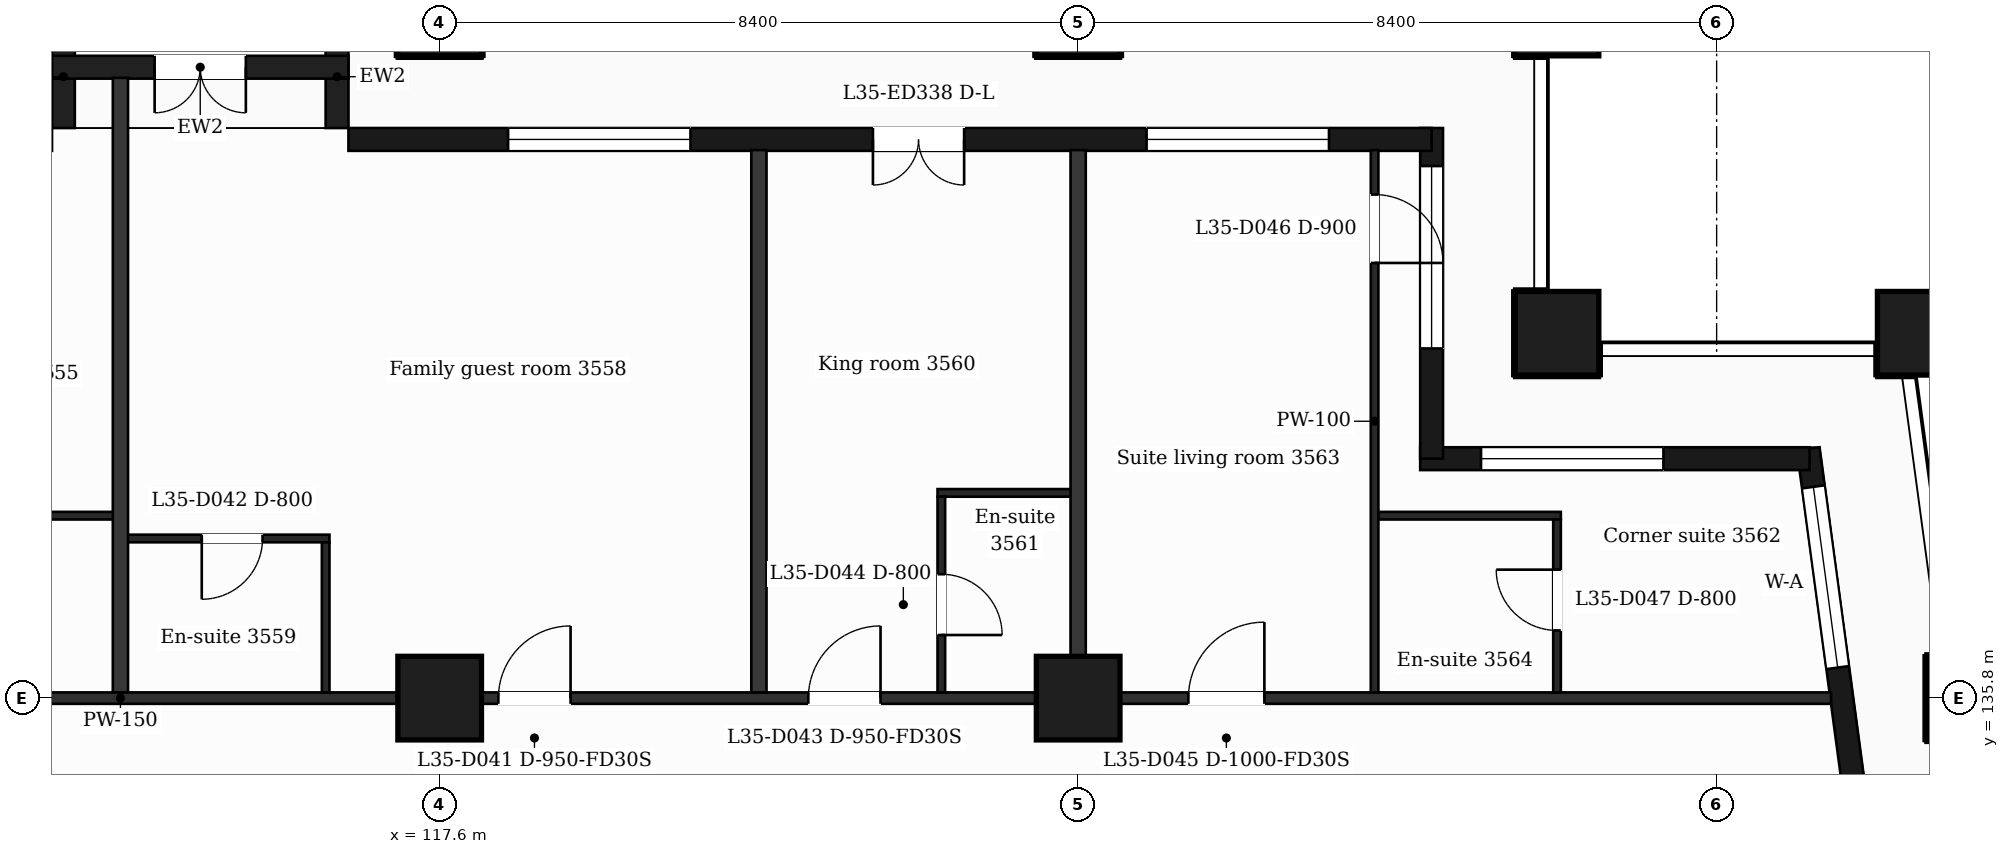
"""IFC4 building model, lengths in metres.
Left out: names, types, materials, properties, quantities, classifications, styles, units other than length and angle.
Written with IfcOpenShell. Run it as: python <this file> out.ifc"""

import sys

from ifc_helpers import new_model, si_unit, direction, frame, frame_2d, origin, origin_2d, place, context, subcontext, project, spatial, rectangle, extrude, element, fill, save


model = new_model("IFC4")
c1 = context("Model", 3, precision=1e-05, world=origin(), true_north=direction((0.0, 1.0)))
c2 = subcontext(c1, "Body", "Model", "MODEL_VIEW")
j1 = project(units=[si_unit("LENGTHUNIT", "METRE"), si_unit("PLANEANGLEUNIT", "RADIAN")], contexts=[c1])
p1 = place(None, origin())
s1 = spatial("IfcSite", under=j1, at=p1, CompositionType="ELEMENT")
p2 = place(p1, origin())
s2 = spatial("IfcBuilding", under=s1, at=p2, CompositionType="ELEMENT")
p3 = place(p2, frame((0.0, 0.0, 151.5)))
s3 = spatial("IfcBuildingStorey", under=s2, at=p3, CompositionType="ELEMENT", Elevation=151.5)
for number, where, z_axis, x_axis in (
    (1, (132.3, 140.6, 0.0), (0.0, 0.0, 1.0), (1.0, 0.0, 0.0)),
    (2, (137.065, 140.6, 0.0), (0.0, 0.0, 1.0), (1.0, 0.0, 0.0)),
    (3, (117.6, 135.8, 0.0), (0.0, 0.0, 1.0), (1.0, 0.0, 0.0)),
    (4, (126.0, 135.8, 0.0), (0.0, 0.0, 1.0), (1.0, 0.0, 0.0)),
    (5, (137.711, 135.8, 0.0), (0.0, 0.0, 1.0), (1.0, 0.0, 0.0)),
    (6, (117.6, 144.8, 0.0), (0.0, 0.0, 1.0), (1.0, 0.0, 0.0)),
    (7, (126.0, 144.8, 0.0), (0.0, 0.0, 1.0), (1.0, 0.0, 0.0)),
    (8, (132.3, 144.8, 0.0), (0.0, 0.0, 1.0), (1.0, 0.0, 0.0)),
):
    element("IfcColumn", number, at=place(p3, frame(where, z_axis=z_axis, x_axis=x_axis)), inside=s3, PredefinedType="COLUMN", context=c2, shape_type="SweptSolid", body=[
        extrude(rectangle(XDim=1.1, YDim=1.1, at=origin_2d()), origin(), (0.0, 0.0, 1.0), 3.7),
    ])
p4 = place(p3, frame((136.504, 132.4, 0.0), z_axis=(0.0, 0.0, 1.0), x_axis=(-0.133399697462, 0.99106231929, 0.0)))
e9 = element("IfcWall", 9, at=p4, inside=s3, PredefinedType="SOLIDWALL", context=c2, shape_type="SweptSolid", body=[
    extrude(rectangle(XDim=6.74, YDim=0.3, at=frame_2d((3.37, 0.0))), origin(), (0.0, 0.0, 1.0), 3.38),
])
p5 = place(p4, frame((1.115, 0.0, 0.0)))
e10 = element("IfcOpeningElement", 10, at=p5, cuts=e9, PredefinedType="OPENING", context=c2, shape_type="SweptSolid", body=[
    extrude(rectangle(XDim=1.2, YDim=2.4, at=frame_2d((0.6, 1.2))), frame((0.0, 0.16, 0.0), z_axis=(0.0, -1.0, 0.0), x_axis=(1.0, 0.0, 0.0)), (0.0, 0.0, 1.0), 0.32),
])
p6 = place(p4, frame((3.835, 0.0, 0.9)))
e11 = element("IfcOpeningElement", 11, at=p6, cuts=e9, PredefinedType="OPENING", context=c2, shape_type="SweptSolid", body=[
    extrude(rectangle(XDim=2.4, YDim=2.1, at=frame_2d((1.2, 1.05))), frame((0.0, 0.16, 0.0), z_axis=(0.0, -1.0, 0.0), x_axis=(1.0, 0.0, 0.0)), (0.0, 0.0, 1.0), 0.32),
])
p7 = place(p3, frame((135.623, 138.95, 0.0), z_axis=(0.0, 0.0, 1.0), x_axis=(-1.0, 0.0, 0.0)))
e12 = element("IfcWall", 12, at=p7, inside=s3, PredefinedType="SOLIDWALL", context=c2, shape_type="SweptSolid", body=[
    extrude(rectangle(XDim=5.123, YDim=0.3, at=frame_2d((2.561, 0.0))), origin(), (0.0, 0.0, 1.0), 3.38),
])
p8 = place(p7, frame((1.923, 0.0, 0.9)))
e13 = element("IfcOpeningElement", 13, at=p8, cuts=e12, PredefinedType="OPENING", context=c2, shape_type="SweptSolid", body=[
    extrude(rectangle(XDim=2.4, YDim=2.1, at=frame_2d((1.2, 1.05))), frame((0.0, 0.16, 0.0), z_axis=(0.0, -1.0, 0.0), x_axis=(1.0, 0.0, 0.0)), (0.0, 0.0, 1.0), 0.32),
])
p9 = place(p3, frame((130.65, 138.95, 0.0), z_axis=(0.0, 0.0, 1.0), x_axis=(0.0, 1.0, 0.0)))
e14 = element("IfcWall", 14, at=p9, inside=s3, PredefinedType="SOLIDWALL", context=c2, shape_type="SweptSolid", body=[
    extrude(rectangle(XDim=4.35, YDim=0.3, at=frame_2d((2.175, 0.0))), origin(), (0.0, 0.0, 1.0), 3.38),
])
p10 = place(p9, frame((1.45, 0.0, 0.9)))
e15 = element("IfcOpeningElement", 15, at=p10, cuts=e14, PredefinedType="OPENING", context=c2, shape_type="SweptSolid", body=[
    extrude(rectangle(XDim=2.4, YDim=2.1, at=frame_2d((1.2, 1.05))), frame((0.0, 0.16, 0.0), z_axis=(0.0, -1.0, 0.0), x_axis=(1.0, 0.0, 0.0)), (0.0, 0.0, 1.0), 0.32),
])
p11 = place(p3, frame((130.65, 143.15, 0.0), z_axis=(0.0, 0.0, 1.0), x_axis=(-1.0, 0.0, 0.0)))
e16 = element("IfcWall", 16, at=p11, inside=s3, PredefinedType="SOLIDWALL", context=c2, shape_type="SweptSolid", body=[
    extrude(rectangle(XDim=14.25, YDim=0.3, at=frame_2d((7.125, 0.0))), origin(), (0.0, 0.0, 1.0), 3.38),
])
p12 = place(p11, frame((1.35, 0.0, 0.9)))
e17 = element("IfcOpeningElement", 17, at=p12, cuts=e16, PredefinedType="OPENING", context=c2, shape_type="SweptSolid", body=[
    extrude(rectangle(XDim=2.4, YDim=2.1, at=frame_2d((1.2, 1.05))), frame((0.0, 0.16, 0.0), z_axis=(0.0, -1.0, 0.0), x_axis=(1.0, 0.0, 0.0)), (0.0, 0.0, 1.0), 0.32),
])
p13 = place(p11, frame((6.15, 0.0, 0.0)))
e18 = element("IfcOpeningElement", 18, at=p13, cuts=e16, PredefinedType="OPENING", context=c2, shape_type="SweptSolid", body=[
    extrude(rectangle(XDim=1.2, YDim=2.4, at=frame_2d((0.6, 1.2))), frame((0.0, 0.16, 0.0), z_axis=(0.0, -1.0, 0.0), x_axis=(1.0, 0.0, 0.0)), (0.0, 0.0, 1.0), 0.32),
])
p14 = place(p11, frame((9.75, 0.0, 0.9)))
e19 = element("IfcOpeningElement", 19, at=p14, cuts=e16, PredefinedType="OPENING", context=c2, shape_type="SweptSolid", body=[
    extrude(rectangle(XDim=2.4, YDim=2.1, at=frame_2d((1.2, 1.05))), frame((0.0, 0.16, 0.0), z_axis=(0.0, -1.0, 0.0), x_axis=(1.0, 0.0, 0.0)), (0.0, 0.0, 1.0), 0.32),
])
for number, where, z_axis, x_axis in (
    (20, (116.25, 143.3, 0.0), (0.0, 0.0, 1.0), (0.0, 1.0, 0.0)),
    (21, (112.65, 143.3, 0.0), (0.0, 0.0, 1.0), (0.0, 1.0, 0.0)),
):
    element("IfcWall", number, at=place(p3, frame(where, z_axis=z_axis, x_axis=x_axis)), inside=s3, PredefinedType="SOLIDWALL", context=c2, shape_type="SweptSolid", body=[
        extrude(rectangle(XDim=1.35, YDim=0.3, at=frame_2d((0.675, 0.0))), origin(), (0.0, 0.0, 1.0), 3.38),
    ])
p15 = place(p3, frame((116.4, 144.1, 0.0), z_axis=(0.0, 0.0, 1.0), x_axis=(-1.0, 0.0, 0.0)))
e22 = element("IfcWall", 22, at=p15, inside=s3, PredefinedType="SOLIDWALL", context=c2, shape_type="SweptSolid", body=[
    extrude(rectangle(XDim=3.9, YDim=0.3, at=frame_2d((1.95, 0.0))), origin(), (0.0, 0.0, 1.0), 3.38),
])
p16 = place(p15, frame((1.35, 0.0, 0.0)))
e23 = element("IfcOpeningElement", 23, at=p16, cuts=e22, PredefinedType="OPENING", context=c2, shape_type="SweptSolid", body=[
    extrude(rectangle(XDim=1.2, YDim=2.4, at=frame_2d((0.6, 1.2))), frame((0.0, 0.16, 0.0), z_axis=(0.0, -1.0, 0.0), x_axis=(1.0, 0.0, 0.0)), (0.0, 0.0, 1.0), 0.32),
])
p17 = place(p3, frame((90.895, 135.8, 0.0), z_axis=(0.0, 0.0, 1.0), x_axis=(1.0, 0.0, 0.0)))
e24 = element("IfcWall", 24, at=p17, inside=s3, PredefinedType="PARTITIONING", context=c2, shape_type="SweptSolid", body=[
    extrude(rectangle(XDim=45.011, YDim=0.15, at=frame_2d((22.505, 0.0))), origin(), (0.0, 0.0, 1.0), 3.38),
])
p18 = place(p17, frame((6.906, 0.0, 0.0)))
e25 = element("IfcOpeningElement", 25, at=p18, cuts=e24, PredefinedType="OPENING", context=c2, shape_type="SweptSolid", body=[
    extrude(rectangle(XDim=1.0, YDim=2.1, at=frame_2d((0.5, 1.05))), frame((0.0, 0.085, 0.0), z_axis=(0.0, -1.0, 0.0), x_axis=(1.0, 0.0, 0.0)), (0.0, 0.0, 1.0), 0.17),
])
p19 = place(p17, frame((12.935, 0.0, 0.0)))
e26 = element("IfcOpeningElement", 26, at=p19, cuts=e24, PredefinedType="OPENING", context=c2, shape_type="SweptSolid", body=[
    extrude(rectangle(XDim=1.0, YDim=2.1, at=frame_2d((0.5, 1.05))), frame((0.0, 0.085, 0.0), z_axis=(0.0, -1.0, 0.0), x_axis=(1.0, 0.0, 0.0)), (0.0, 0.0, 1.0), 0.17),
])
p20 = place(p17, frame((27.477, 0.0, 0.0)))
e27 = element("IfcOpeningElement", 27, at=p20, cuts=e24, PredefinedType="OPENING", context=c2, shape_type="SweptSolid", body=[
    extrude(rectangle(XDim=0.95, YDim=2.1, at=frame_2d((0.475, 1.05))), frame((0.0, 0.085, 0.0), z_axis=(0.0, -1.0, 0.0), x_axis=(1.0, 0.0, 0.0)), (0.0, 0.0, 1.0), 0.17),
])
p21 = place(p17, frame((31.555, 0.0, 0.0)))
e28 = element("IfcOpeningElement", 28, at=p21, cuts=e24, PredefinedType="OPENING", context=c2, shape_type="SweptSolid", body=[
    extrude(rectangle(XDim=0.95, YDim=2.1, at=frame_2d((0.475, 1.05))), frame((0.0, 0.085, 0.0), z_axis=(0.0, -1.0, 0.0), x_axis=(1.0, 0.0, 0.0)), (0.0, 0.0, 1.0), 0.17),
])
p22 = place(p17, frame((36.555, 0.0, 0.0)))
e29 = element("IfcOpeningElement", 29, at=p22, cuts=e24, PredefinedType="OPENING", context=c2, shape_type="SweptSolid", body=[
    extrude(rectangle(XDim=1.0, YDim=2.1, at=frame_2d((0.5, 1.05))), frame((0.0, 0.085, 0.0), z_axis=(0.0, -1.0, 0.0), x_axis=(1.0, 0.0, 0.0)), (0.0, 0.0, 1.0), 0.17),
])
p23 = place(p3, frame((113.4, 137.9, 0.0), z_axis=(0.0, 0.0, 1.0), x_axis=(1.0, 0.0, 0.0)))
e30 = element("IfcWall", 30, at=p23, inside=s3, PredefinedType="PARTITIONING", context=c2, shape_type="SweptSolid", body=[
    extrude(rectangle(XDim=2.75, YDim=0.1, at=frame_2d((1.375, 0.0))), origin(), (0.0, 0.0, 1.0), 3.38),
])
p24 = place(p23, frame((1.07, 0.0, 0.0)))
e31 = element("IfcOpeningElement", 31, at=p24, cuts=e30, PredefinedType="OPENING", context=c2, shape_type="SweptSolid", body=[
    extrude(rectangle(XDim=0.8, YDim=2.1, at=frame_2d((0.4, 1.05))), frame((0.0, 0.06, 0.0), z_axis=(0.0, -1.0, 0.0), x_axis=(1.0, 0.0, 0.0)), (0.0, 0.0, 1.0), 0.12),
])
p25 = place(p3, frame((111.25, 138.2, 0.0), z_axis=(0.0, 0.0, 1.0), x_axis=(1.0, 0.0, 0.0)))
e32 = element("IfcWall", 32, at=p25, inside=s3, PredefinedType="PARTITIONING", context=c2, shape_type="SweptSolid", body=[
    extrude(rectangle(XDim=2.15, YDim=0.1, at=frame_2d((1.075, 0.0))), origin(), (0.0, 0.0, 1.0), 3.38),
])
p26 = place(p3, frame((129.9, 138.2, 0.0), z_axis=(0.0, 0.0, 1.0), x_axis=(1.0, 0.0, 0.0)))
e33 = element("IfcWall", 33, at=p26, inside=s3, PredefinedType="PARTITIONING", context=c2, shape_type="SweptSolid", body=[
    extrude(rectangle(XDim=2.45, YDim=0.1, at=frame_2d((1.225, 0.0))), origin(), (0.0, 0.0, 1.0), 3.38),
])
p27 = place(p3, frame((124.15, 138.5, 0.0), z_axis=(0.0, 0.0, 1.0), x_axis=(1.0, 0.0, 0.0)))
e34 = element("IfcWall", 34, at=p27, inside=s3, PredefinedType="PARTITIONING", context=c2, shape_type="SweptSolid", body=[
    extrude(rectangle(XDim=1.85, YDim=0.1, at=frame_2d((0.925, 0.0))), origin(), (0.0, 0.0, 1.0), 3.38),
])
p28 = place(p3, frame((113.4, 135.875, 0.0), z_axis=(0.0, 0.0, 1.0), x_axis=(0.0, 1.0, 0.0)))
e35 = element("IfcWall", 35, at=p28, inside=s3, PredefinedType="PARTITIONING", context=c2, shape_type="SweptSolid", body=[
    extrude(rectangle(XDim=8.085, YDim=0.2, at=frame_2d((4.042, 0.0))), origin(), (0.0, 0.0, 1.0), 3.38),
])
p29 = place(p3, frame((116.1, 135.875, 0.0), z_axis=(0.0, 0.0, 1.0), x_axis=(0.0, 1.0, 0.0)))
e36 = element("IfcWall", 36, at=p29, inside=s3, PredefinedType="PARTITIONING", context=c2, shape_type="SweptSolid", body=[
    extrude(rectangle(XDim=1.975, YDim=0.1, at=frame_2d((0.988, 0.0))), origin(), (0.0, 0.0, 1.0), 3.38),
])
p30 = place(p3, frame((121.8, 135.875, 0.0), z_axis=(0.0, 0.0, 1.0), x_axis=(0.0, 1.0, 0.0)))
e37 = element("IfcWall", 37, at=p30, inside=s3, PredefinedType="PARTITIONING", context=c2, shape_type="SweptSolid", body=[
    extrude(rectangle(XDim=7.135, YDim=0.2, at=frame_2d((3.567, 0.0))), origin(), (0.0, 0.0, 1.0), 3.38),
])
p31 = place(p3, frame((124.2, 135.875, 0.0), z_axis=(0.0, 0.0, 1.0), x_axis=(0.0, 1.0, 0.0)))
e38 = element("IfcWall", 38, at=p31, inside=s3, PredefinedType="PARTITIONING", context=c2, shape_type="SweptSolid", body=[
    extrude(rectangle(XDim=2.575, YDim=0.1, at=frame_2d((1.288, 0.0))), origin(), (0.0, 0.0, 1.0), 3.38),
])
p32 = place(p31, frame((0.755, 0.0, 0.0)))
e39 = element("IfcOpeningElement", 39, at=p32, cuts=e38, PredefinedType="OPENING", context=c2, shape_type="SweptSolid", body=[
    extrude(rectangle(XDim=0.8, YDim=2.1, at=frame_2d((0.4, 1.05))), frame((0.0, 0.06, 0.0), z_axis=(0.0, -1.0, 0.0), x_axis=(1.0, 0.0, 0.0)), (0.0, 0.0, 1.0), 0.12),
])
p33 = place(p3, frame((126.0, 135.875, 0.0), z_axis=(0.0, 0.0, 1.0), x_axis=(0.0, 1.0, 0.0)))
e40 = element("IfcWall", 40, at=p33, inside=s3, PredefinedType="PARTITIONING", context=c2, shape_type="SweptSolid", body=[
    extrude(rectangle(XDim=7.135, YDim=0.2, at=frame_2d((3.567, 0.0))), origin(), (0.0, 0.0, 1.0), 3.38),
])
p34 = place(p3, frame((129.9, 135.875, 0.0), z_axis=(0.0, 0.0, 1.0), x_axis=(0.0, 1.0, 0.0)))
e41 = element("IfcWall", 41, at=p34, inside=s3, PredefinedType="PARTITIONING", context=c2, shape_type="SweptSolid", body=[
    extrude(rectangle(XDim=7.135, YDim=0.1, at=frame_2d((3.567, 0.0))), origin(), (0.0, 0.0, 1.0), 3.38),
])
p35 = place(p34, frame((5.65, 0.0, 0.0)))
e42 = element("IfcOpeningElement", 42, at=p35, cuts=e41, PredefinedType="OPENING", context=c2, shape_type="SweptSolid", body=[
    extrude(rectangle(XDim=0.9, YDim=2.1, at=frame_2d((0.45, 1.05))), frame((0.0, 0.06, 0.0), z_axis=(0.0, -1.0, 0.0), x_axis=(1.0, 0.0, 0.0)), (0.0, 0.0, 1.0), 0.12),
])
p36 = place(p3, frame((132.3, 135.875, 0.0), z_axis=(0.0, 0.0, 1.0), x_axis=(0.0, 1.0, 0.0)))
e43 = element("IfcWall", 43, at=p36, inside=s3, PredefinedType="PARTITIONING", context=c2, shape_type="SweptSolid", body=[
    extrude(rectangle(XDim=2.275, YDim=0.1, at=frame_2d((1.137, 0.0))), origin(), (0.0, 0.0, 1.0), 3.38),
])
p37 = place(p36, frame((0.815, 0.0, 0.0)))
e44 = element("IfcOpeningElement", 44, at=p37, cuts=e43, PredefinedType="OPENING", context=c2, shape_type="SweptSolid", body=[
    extrude(rectangle(XDim=0.8, YDim=2.1, at=frame_2d((0.4, 1.05))), frame((0.0, 0.06, 0.0), z_axis=(0.0, -1.0, 0.0), x_axis=(1.0, 0.0, 0.0)), (0.0, 0.0, 1.0), 0.12),
])
p38 = place(p6, origin())
e45 = element("IfcWindow", 45, at=p38, inside=s3, PartitioningType="SINGLE_PANEL", PredefinedType="WINDOW", context=c2, shape_type="SweptSolid", body=[
    extrude(rectangle(XDim=2.4, YDim=2.1, at=frame_2d((1.2, 1.05))), frame((0.0, 0.03, 0.0), z_axis=(0.0, -1.0, 0.0), x_axis=(1.0, 0.0, 0.0)), (0.0, 0.0, 1.0), 0.06),
])
fill(e11, e45)
p39 = place(p8, origin())
e46 = element("IfcWindow", 46, at=p39, inside=s3, PartitioningType="SINGLE_PANEL", PredefinedType="WINDOW", context=c2, shape_type="SweptSolid", body=[
    extrude(rectangle(XDim=2.4, YDim=2.1, at=frame_2d((1.2, 1.05))), frame((0.0, 0.03, 0.0), z_axis=(0.0, -1.0, 0.0), x_axis=(1.0, 0.0, 0.0)), (0.0, 0.0, 1.0), 0.06),
])
fill(e13, e46)
p40 = place(p10, origin())
e47 = element("IfcWindow", 47, at=p40, inside=s3, PartitioningType="SINGLE_PANEL", PredefinedType="WINDOW", context=c2, shape_type="SweptSolid", body=[
    extrude(rectangle(XDim=2.4, YDim=2.1, at=frame_2d((1.2, 1.05))), frame((0.0, 0.03, 0.0), z_axis=(0.0, -1.0, 0.0), x_axis=(1.0, 0.0, 0.0)), (0.0, 0.0, 1.0), 0.06),
])
fill(e15, e47)
p41 = place(p12, origin())
e48 = element("IfcWindow", 48, at=p41, inside=s3, PartitioningType="SINGLE_PANEL", PredefinedType="WINDOW", context=c2, shape_type="SweptSolid", body=[
    extrude(rectangle(XDim=2.4, YDim=2.1, at=frame_2d((1.2, 1.05))), frame((0.0, 0.03, 0.0), z_axis=(0.0, -1.0, 0.0), x_axis=(1.0, 0.0, 0.0)), (0.0, 0.0, 1.0), 0.06),
])
fill(e17, e48)
p42 = place(p13, origin())
e49 = element("IfcDoor", 49, at=p42, inside=s3, OperationType="DOUBLE_DOOR_SINGLE_SWING", PredefinedType="DOOR", context=c2, shape_type="SweptSolid", body=[
    extrude(rectangle(XDim=1.2, YDim=2.4, at=frame_2d((0.6, 1.2))), frame((0.0, 0.025, 0.0), z_axis=(0.0, -1.0, 0.0), x_axis=(1.0, 0.0, 0.0)), (0.0, 0.0, 1.0), 0.05),
])
fill(e18, e49)
p43 = place(p14, origin())
e50 = element("IfcWindow", 50, at=p43, inside=s3, PartitioningType="SINGLE_PANEL", PredefinedType="WINDOW", context=c2, shape_type="SweptSolid", body=[
    extrude(rectangle(XDim=2.4, YDim=2.1, at=frame_2d((1.2, 1.05))), frame((0.0, 0.03, 0.0), z_axis=(0.0, -1.0, 0.0), x_axis=(1.0, 0.0, 0.0)), (0.0, 0.0, 1.0), 0.06),
])
fill(e19, e50)
p44 = place(p16, origin())
e51 = element("IfcDoor", 51, at=p44, inside=s3, OperationType="DOUBLE_DOOR_SINGLE_SWING", PredefinedType="DOOR", context=c2, shape_type="SweptSolid", body=[
    extrude(rectangle(XDim=1.2, YDim=2.4, at=frame_2d((0.6, 1.2))), frame((0.0, 0.025, 0.0), z_axis=(0.0, -1.0, 0.0), x_axis=(1.0, 0.0, 0.0)), (0.0, 0.0, 1.0), 0.05),
])
fill(e23, e51)
p45 = place(p20, origin())
e52 = element("IfcDoor", 52, at=p45, inside=s3, OperationType="SINGLE_SWING_RIGHT", PredefinedType="DOOR", context=c2, shape_type="SweptSolid", body=[
    extrude(rectangle(XDim=0.95, YDim=2.1, at=frame_2d((0.475, 1.05))), frame((0.0, 0.025, 0.0), z_axis=(0.0, -1.0, 0.0), x_axis=(1.0, 0.0, 0.0)), (0.0, 0.0, 1.0), 0.05),
])
fill(e27, e52)
p46 = place(p24, origin())
e53 = element("IfcDoor", 53, at=p46, inside=s3, OperationType="SINGLE_SWING_LEFT", PredefinedType="DOOR", context=c2, shape_type="SweptSolid", body=[
    extrude(rectangle(XDim=0.8, YDim=2.1, at=frame_2d((0.4, 1.05))), frame((0.0, 0.025, 0.0), z_axis=(0.0, -1.0, 0.0), x_axis=(1.0, 0.0, 0.0)), (0.0, 0.0, 1.0), 0.05),
])
fill(e31, e53)
p47 = place(p21, origin())
e54 = element("IfcDoor", 54, at=p47, inside=s3, OperationType="SINGLE_SWING_RIGHT", PredefinedType="DOOR", context=c2, shape_type="SweptSolid", body=[
    extrude(rectangle(XDim=0.95, YDim=2.1, at=frame_2d((0.475, 1.05))), frame((0.0, 0.025, 0.0), z_axis=(0.0, -1.0, 0.0), x_axis=(1.0, 0.0, 0.0)), (0.0, 0.0, 1.0), 0.05),
])
fill(e28, e54)
p48 = place(p32, origin())
e55 = element("IfcDoor", 55, at=p48, inside=s3, OperationType="SINGLE_SWING_LEFT", PredefinedType="DOOR", context=c2, shape_type="SweptSolid", body=[
    extrude(rectangle(XDim=0.8, YDim=2.1, at=frame_2d((0.4, 1.05))), frame((0.0, 0.025, 0.0), z_axis=(0.0, -1.0, 0.0), x_axis=(1.0, 0.0, 0.0)), (0.0, 0.0, 1.0), 0.05),
])
fill(e39, e55)
p49 = place(p22, origin())
e56 = element("IfcDoor", 56, at=p49, inside=s3, OperationType="SINGLE_SWING_RIGHT", PredefinedType="DOOR", context=c2, shape_type="SweptSolid", body=[
    extrude(rectangle(XDim=1.0, YDim=2.1, at=frame_2d((0.5, 1.05))), frame((0.0, 0.025, 0.0), z_axis=(0.0, -1.0, 0.0), x_axis=(1.0, 0.0, 0.0)), (0.0, 0.0, 1.0), 0.05),
])
fill(e29, e56)
p50 = place(p35, origin())
e57 = element("IfcDoor", 57, at=p50, inside=s3, OperationType="SINGLE_SWING_LEFT", PredefinedType="DOOR", context=c2, shape_type="SweptSolid", body=[
    extrude(rectangle(XDim=0.9, YDim=2.1, at=frame_2d((0.45, 1.05))), frame((0.0, 0.025, 0.0), z_axis=(0.0, -1.0, 0.0), x_axis=(1.0, 0.0, 0.0)), (0.0, 0.0, 1.0), 0.05),
])
fill(e42, e57)
p51 = place(p37, origin())
e58 = element("IfcDoor", 58, at=p51, inside=s3, OperationType="SINGLE_SWING_RIGHT", PredefinedType="DOOR", context=c2, shape_type="SweptSolid", body=[
    extrude(rectangle(XDim=0.8, YDim=2.1, at=frame_2d((0.4, 1.05))), frame((0.0, 0.025, 0.0), z_axis=(0.0, -1.0, 0.0), x_axis=(1.0, 0.0, 0.0)), (0.0, 0.0, 1.0), 0.05),
])
fill(e44, e58)
save(model, sys.argv[1])
